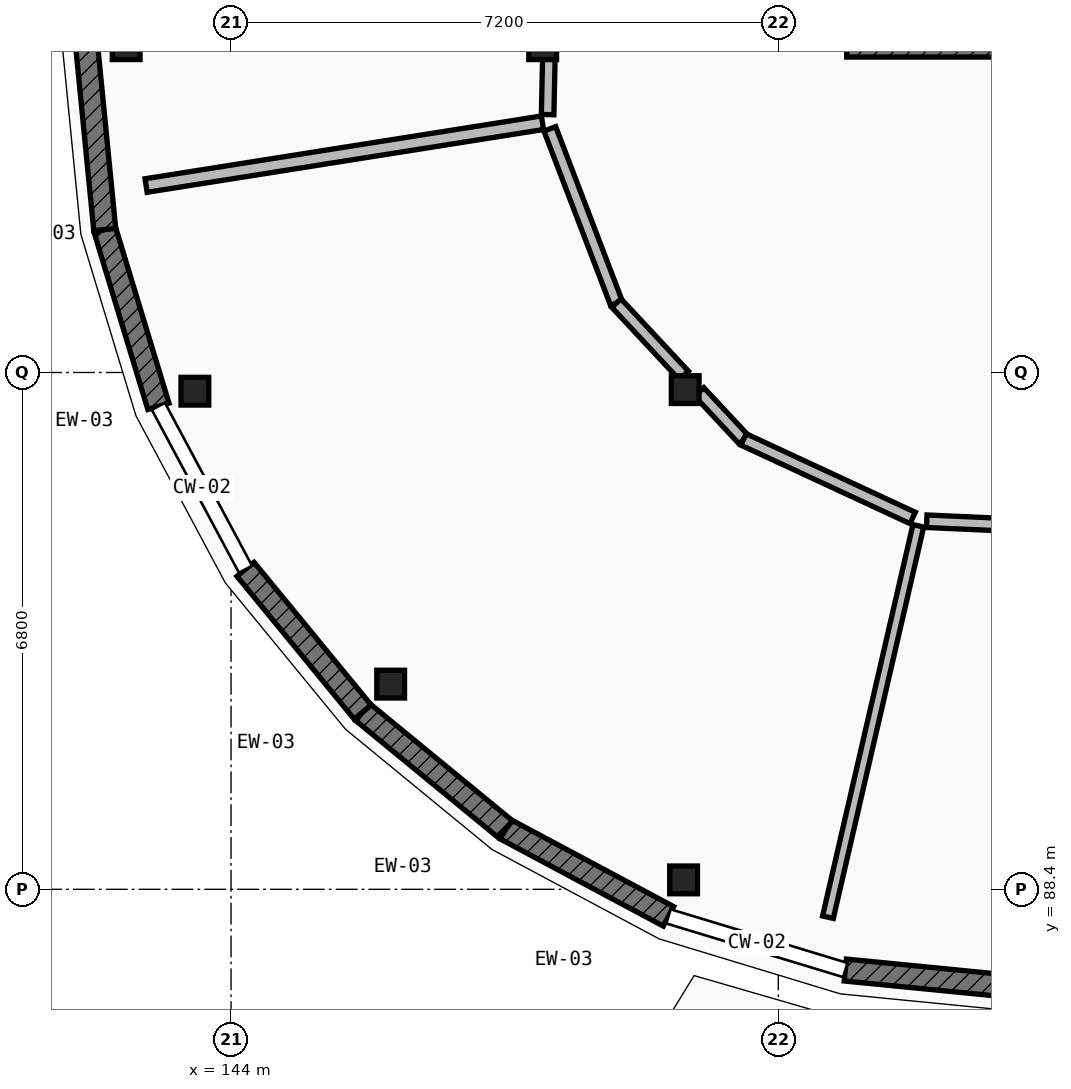
"""IFC4 building model, lengths in metres.
Left out: names, types, materials, properties, quantities, classifications, styles, units other than length and angle.
Written with IfcOpenShell. Run it as: python <this file> out.ifc"""

import sys

from ifc_helpers import new_model, si_unit, direction, frame, frame_2d, origin, origin_2d, place, context, subcontext, project, spatial, rectangle, extrude, element, fill, save


model = new_model("IFC4")
c1 = context("Model", 3, precision=1e-05, world=origin(), true_north=direction((0.0, 1.0)))
c2 = subcontext(c1, "Body", "Model", "MODEL_VIEW")
j1 = project(units=[si_unit("LENGTHUNIT", "METRE"), si_unit("PLANEANGLEUNIT", "RADIAN")], contexts=[c1])
p1 = place(None, origin())
s1 = spatial("IfcSite", under=j1, at=p1, CompositionType="ELEMENT")
p2 = place(p1, origin())
s2 = spatial("IfcBuilding", under=s1, at=p2, CompositionType="ELEMENT")
p3 = place(p2, frame((0.0, 0.0, 8.75)))
s3 = spatial("IfcBuildingStorey", under=s2, at=p3, CompositionType="ELEMENT", Elevation=8.75)
for number, where, z_axis, x_axis in (
    (1, (142.62, 99.5, 0.0), (0.0, 0.0, 1.0), (1.0, 0.0, 0.0)),
    (2, (143.524, 94.954, 0.0), (0.0, 0.0, 1.0), (1.0, 0.0, 0.0)),
    (3, (146.1, 91.1, 0.0), (0.0, 0.0, 1.0), (1.0, 0.0, 0.0)),
    (4, (149.954, 88.524, 0.0), (0.0, 0.0, 1.0), (1.0, 0.0, 0.0)),
    (5, (148.1, 99.5, 0.0), (0.0, 0.0, 1.0), (1.0, 0.0, 0.0)),
    (6, (149.975, 94.975, 0.0), (0.0, 0.0, 1.0), (1.0, 0.0, 0.0)),
):
    element("IfcColumn", number, at=place(p3, frame(where, z_axis=z_axis, x_axis=x_axis)), inside=s3, PredefinedType="COLUMN", context=c2, shape_type="SweptSolid", body=[
        extrude(rectangle(XDim=0.365, YDim=0.365, at=origin_2d()), origin(), (0.0, 0.0, 1.0), 4.2),
    ])
p4 = place(p3, frame((154.5, 87.1, 0.0), z_axis=(0.0, 0.0, 1.0), x_axis=(-0.995202863323, 0.097832820839, 0.0)))
e7 = element("IfcWall", 7, at=p4, inside=s3, PredefinedType="ELEMENTEDWALL", context=c2, shape_type="SweptSolid", body=[
    extrude(rectangle(XDim=2.431, YDim=0.29, at=frame_2d((1.215, 0.0))), origin(), (0.0, 0.0, 1.0), 3.329),
])
p5 = place(p4, frame((0.59, 0.0, 0.85)))
e8 = element("IfcOpeningElement", 8, at=p5, cuts=e7, PredefinedType="OPENING", context=c2, shape_type="SweptSolid", body=[
    extrude(rectangle(XDim=1.25, YDim=2.1, at=frame_2d((0.625, 1.05))), frame((0.0, 0.155, 0.0), z_axis=(0.0, -1.0, 0.0), x_axis=(1.0, 0.0, 0.0)), (0.0, 0.0, 1.0), 0.31),
])
p6 = place(p3, frame((149.755, 88.044, 0.0), z_axis=(0.0, 0.0, 1.0), x_axis=(-0.881902152415, 0.471432490996, 0.0)))
e9 = element("IfcWall", 9, at=p6, inside=s3, PredefinedType="ELEMENTEDWALL", context=c2, shape_type="SweptSolid", body=[
    extrude(rectangle(XDim=2.431, YDim=0.29, at=frame_2d((1.215, 0.0))), origin(), (0.0, 0.0, 1.0), 3.329),
])
p7 = place(p6, frame((0.576, 0.0, 0.85)))
e10 = element("IfcOpeningElement", 10, at=p7, cuts=e9, PredefinedType="OPENING", context=c2, shape_type="SweptSolid", body=[
    extrude(rectangle(XDim=1.28, YDim=1.65, at=frame_2d((0.64, 0.825))), frame((0.0, 0.155, 0.0), z_axis=(0.0, -1.0, 0.0), x_axis=(1.0, 0.0, 0.0)), (0.0, 0.0, 1.0), 0.31),
])
p8 = place(p3, frame((147.611, 89.19, 0.0), z_axis=(0.0, 0.0, 1.0), x_axis=(-0.773048113134, 0.634347392822, 0.0)))
e11 = element("IfcWall", 11, at=p8, inside=s3, PredefinedType="ELEMENTEDWALL", context=c2, shape_type="SweptSolid", body=[
    extrude(rectangle(XDim=2.431, YDim=0.29, at=frame_2d((1.215, 0.0))), origin(), (0.0, 0.0, 1.0), 3.329),
])
p9 = place(p8, frame((0.565, 0.0, 0.85)))
e12 = element("IfcOpeningElement", 12, at=p9, cuts=e11, PredefinedType="OPENING", context=c2, shape_type="SweptSolid", body=[
    extrude(rectangle(XDim=1.3, YDim=1.4, at=frame_2d((0.65, 0.7))), frame((0.0, 0.155, 0.0), z_axis=(0.0, -1.0, 0.0), x_axis=(1.0, 0.0, 0.0)), (0.0, 0.0, 1.0), 0.31),
])
p10 = place(p3, frame((145.732, 90.732, 0.0), z_axis=(0.0, 0.0, 1.0), x_axis=(-0.634347392822, 0.773048113134, 0.0)))
e13 = element("IfcWall", 13, at=p10, inside=s3, PredefinedType="ELEMENTEDWALL", context=c2, shape_type="SweptSolid", body=[
    extrude(rectangle(XDim=2.431, YDim=0.29, at=frame_2d((1.215, 0.0))), origin(), (0.0, 0.0, 1.0), 3.329),
])
p11 = place(p10, frame((0.565, 0.0, 0.85)))
e14 = element("IfcOpeningElement", 14, at=p11, cuts=e13, PredefinedType="OPENING", context=c2, shape_type="SweptSolid", body=[
    extrude(rectangle(XDim=1.3, YDim=1.7, at=frame_2d((0.65, 0.85))), frame((0.0, 0.155, 0.0), z_axis=(0.0, -1.0, 0.0), x_axis=(1.0, 0.0, 0.0)), (0.0, 0.0, 1.0), 0.31),
])
p12 = place(p3, frame((143.044, 94.755, 0.0), z_axis=(0.0, 0.0, 1.0), x_axis=(-0.290442193951, 0.956892539407, 0.0)))
e15 = element("IfcWall", 15, at=p12, inside=s3, PredefinedType="ELEMENTEDWALL", context=c2, shape_type="SweptSolid", body=[
    extrude(rectangle(XDim=2.431, YDim=0.29, at=frame_2d((1.215, 0.0))), origin(), (0.0, 0.0, 1.0), 3.329),
])
p13 = place(p12, frame((0.565, 0.0, 0.85)))
e16 = element("IfcOpeningElement", 16, at=p13, cuts=e15, PredefinedType="OPENING", context=c2, shape_type="SweptSolid", body=[
    extrude(rectangle(XDim=1.3, YDim=2.0, at=frame_2d((0.65, 1.0))), frame((0.0, 0.155, 0.0), z_axis=(0.0, -1.0, 0.0), x_axis=(1.0, 0.0, 0.0)), (0.0, 0.0, 1.0), 0.31),
])
p14 = place(p3, frame((142.338, 97.081, 0.0), z_axis=(0.0, 0.0, 1.0), x_axis=(-0.097832820839, 0.995202863323, 0.0)))
e17 = element("IfcWall", 17, at=p14, inside=s3, PredefinedType="ELEMENTEDWALL", context=c2, shape_type="SweptSolid", body=[
    extrude(rectangle(XDim=2.431, YDim=0.29, at=frame_2d((1.215, 0.0))), origin(), (0.0, 0.0, 1.0), 3.329),
])
p15 = place(p14, frame((0.565, 0.0, 0.7)))
e18 = element("IfcOpeningElement", 18, at=p15, cuts=e17, PredefinedType="OPENING", context=c2, shape_type="SweptSolid", body=[
    extrude(rectangle(XDim=1.3, YDim=2.3, at=frame_2d((0.65, 1.15))), frame((0.0, 0.155, 0.0), z_axis=(0.0, -1.0, 0.0), x_axis=(1.0, 0.0, 0.0)), (0.0, 0.0, 1.0), 0.31),
])
p16 = place(p3, frame((152.1, 99.463, 0.0), z_axis=(0.0, 0.0, 1.0), x_axis=(1.0, 0.0, 0.0)))
e19 = element("IfcWall", 19, at=p16, inside=s3, PredefinedType="SHEAR", context=c2, shape_type="SweptSolid", body=[
    extrude(rectangle(XDim=3.1, YDim=0.225, at=frame_2d((1.55, 0.0))), origin(), (0.0, 0.0, 1.0), 3.975),
])
p17 = place(p16, frame((0.9, 0.0, 0.0)))
e20 = element("IfcOpeningElement", 20, at=p17, cuts=e19, PredefinedType="OPENING", context=c2, shape_type="SweptSolid", body=[
    extrude(rectangle(XDim=1.3, YDim=2.2, at=frame_2d((0.65, 1.1))), frame((0.0, 0.123, 0.0), z_axis=(0.0, -1.0, 0.0), x_axis=(1.0, 0.0, 0.0)), (0.0, 0.0, 1.0), 0.245),
])
p18 = place(p3, frame((148.097, 98.486, 0.0), z_axis=(0.0, 0.0, 1.0), x_axis=(-0.98768185006, -0.156475439167, 0.0)))
e21 = element("IfcWall", 21, at=p18, inside=s3, PredefinedType="PARTITIONING", context=c2, shape_type="SweptSolid", body=[
    extrude(rectangle(XDim=5.28, YDim=0.18, at=frame_2d((2.64, 0.0))), origin(), (0.0, 0.0, 1.0), 3.304),
])
p19 = place(p3, frame((153.042, 93.183, 0.0), z_axis=(0.0, 0.0, 1.0), x_axis=(-0.224943840984, -0.974371730093, 0.0)))
e22 = element("IfcWall", 22, at=p19, inside=s3, PredefinedType="PARTITIONING", context=c2, shape_type="SweptSolid", body=[
    extrude(rectangle(XDim=5.286, YDim=0.145, at=frame_2d((2.643, 0.0))), origin(), (0.0, 0.0, 1.0), 3.304),
])
p20 = place(p3, frame((148.181, 99.331, 0.0), z_axis=(0.0, 0.0, 1.0), x_axis=(-0.021496850658, -0.999768916006, 0.0)))
e23 = element("IfcWall", 23, at=p20, inside=s3, PredefinedType="PARTITIONING", context=c2, shape_type="SweptSolid", body=[
    extrude(rectangle(XDim=0.738, YDim=0.165, at=frame_2d((0.369, 0.0))), origin(), (0.0, 0.0, 1.0), 3.304),
])
p21 = place(p3, frame((148.194, 98.405, 0.0), z_axis=(0.0, 0.0, 1.0), x_axis=(0.357004696351, -0.934102589004, 0.0)))
e24 = element("IfcWall", 24, at=p21, inside=s3, PredefinedType="PARTITIONING", context=c2, shape_type="SweptSolid", body=[
    extrude(rectangle(XDim=2.454, YDim=0.165, at=frame_2d((1.227, 0.0))), origin(), (0.0, 0.0, 1.0), 3.304),
])
p22 = place(p21, frame((0.477, 0.0, 0.0)))
e25 = element("IfcOpeningElement", 25, at=p22, cuts=e24, PredefinedType="OPENING", context=c2, shape_type="SweptSolid", body=[
    extrude(rectangle(XDim=1.5, YDim=2.3, at=frame_2d((0.75, 1.15))), frame((0.0, 0.093, 0.0), z_axis=(0.0, -1.0, 0.0), x_axis=(1.0, 0.0, 0.0)), (0.0, 0.0, 1.0), 0.185),
])
p23 = place(p3, frame((149.07, 96.113, 0.0), z_axis=(0.0, 0.0, 1.0), x_axis=(0.682084089324, -0.731273748395, 0.0)))
e26 = element("IfcWall", 26, at=p23, inside=s3, PredefinedType="PARTITIONING", context=c2, shape_type="SweptSolid", body=[
    extrude(rectangle(XDim=1.3, YDim=0.165, at=frame_2d((0.65, 0.0))), origin(), (0.0, 0.0, 1.0), 3.304),
])
p24 = place(p3, frame((150.16, 94.944, 0.0), z_axis=(0.0, 0.0, 1.0), x_axis=(0.682114678072, -0.731245216024, 0.0)))
e27 = element("IfcWall", 27, at=p24, inside=s3, PredefinedType="PARTITIONING", context=c2, shape_type="SweptSolid", body=[
    extrude(rectangle(XDim=0.855, YDim=0.165, at=frame_2d((0.427, 0.0))), origin(), (0.0, 0.0, 1.0), 3.304),
])
p25 = place(p3, frame((150.743, 94.319, 0.0), z_axis=(0.0, 0.0, 1.0), x_axis=(0.906989961647, -0.421152240255, 0.0)))
e28 = element("IfcWall", 28, at=p25, inside=s3, PredefinedType="PARTITIONING", context=c2, shape_type="SweptSolid", body=[
    extrude(rectangle(XDim=2.453, YDim=0.165, at=frame_2d((1.227, 0.0))), origin(), (0.0, 0.0, 1.0), 3.304),
])
p26 = place(p3, frame((153.153, 93.243, 0.0), z_axis=(0.0, 0.0, 1.0), x_axis=(0.998998504247, -0.044743586258, 0.0)))
e29 = element("IfcWall", 29, at=p26, inside=s3, PredefinedType="PARTITIONING", context=c2, shape_type="SweptSolid", body=[
    extrude(rectangle(XDim=1.184, YDim=0.165, at=frame_2d((0.592, 0.0))), origin(), (0.0, 0.0, 1.0), 3.304),
])
p27 = place(p5, origin())
e30 = element("IfcWindow", 30, at=p27, inside=s3, PartitioningType="SINGLE_PANEL", PredefinedType="WINDOW", context=c2, shape_type="SweptSolid", body=[
    extrude(rectangle(XDim=1.25, YDim=2.1, at=frame_2d((0.625, 1.05))), frame((0.0, 0.03, 0.0), z_axis=(0.0, -1.0, 0.0), x_axis=(1.0, 0.0, 0.0)), (0.0, 0.0, 1.0), 0.06),
])
fill(e8, e30)
p28 = place(p7, origin())
e31 = element("IfcWindow", 31, at=p28, inside=s3, PartitioningType="SINGLE_PANEL", PredefinedType="WINDOW", context=c2, shape_type="SweptSolid", body=[
    extrude(rectangle(XDim=1.28, YDim=1.65, at=frame_2d((0.64, 0.825))), frame((0.0, 0.03, 0.0), z_axis=(0.0, -1.0, 0.0), x_axis=(1.0, 0.0, 0.0)), (0.0, 0.0, 1.0), 0.06),
])
fill(e10, e31)
p29 = place(p9, origin())
e32 = element("IfcWindow", 32, at=p29, inside=s3, PartitioningType="SINGLE_PANEL", PredefinedType="WINDOW", context=c2, shape_type="SweptSolid", body=[
    extrude(rectangle(XDim=1.3, YDim=1.4, at=frame_2d((0.65, 0.7))), frame((0.0, 0.03, 0.0), z_axis=(0.0, -1.0, 0.0), x_axis=(1.0, 0.0, 0.0)), (0.0, 0.0, 1.0), 0.06),
])
fill(e12, e32)
p30 = place(p11, origin())
e33 = element("IfcWindow", 33, at=p30, inside=s3, PartitioningType="SINGLE_PANEL", PredefinedType="WINDOW", context=c2, shape_type="SweptSolid", body=[
    extrude(rectangle(XDim=1.3, YDim=1.7, at=frame_2d((0.65, 0.85))), frame((0.0, 0.03, 0.0), z_axis=(0.0, -1.0, 0.0), x_axis=(1.0, 0.0, 0.0)), (0.0, 0.0, 1.0), 0.06),
])
fill(e14, e33)
p31 = place(p13, origin())
e34 = element("IfcWindow", 34, at=p31, inside=s3, PartitioningType="SINGLE_PANEL", PredefinedType="WINDOW", context=c2, shape_type="SweptSolid", body=[
    extrude(rectangle(XDim=1.3, YDim=2.0, at=frame_2d((0.65, 1.0))), frame((0.0, 0.03, 0.0), z_axis=(0.0, -1.0, 0.0), x_axis=(1.0, 0.0, 0.0)), (0.0, 0.0, 1.0), 0.06),
])
fill(e16, e34)
p32 = place(p15, origin())
e35 = element("IfcWindow", 35, at=p32, inside=s3, PartitioningType="SINGLE_PANEL", PredefinedType="WINDOW", context=c2, shape_type="SweptSolid", body=[
    extrude(rectangle(XDim=1.3, YDim=2.3, at=frame_2d((0.65, 1.15))), frame((0.0, 0.03, 0.0), z_axis=(0.0, -1.0, 0.0), x_axis=(1.0, 0.0, 0.0)), (0.0, 0.0, 1.0), 0.06),
])
fill(e18, e35)
p33 = place(p22, origin())
e36 = element("IfcDoor", 36, at=p33, inside=s3, OperationType="SINGLE_SWING_RIGHT", PredefinedType="DOOR", context=c2, shape_type="SweptSolid", body=[
    extrude(rectangle(XDim=1.5, YDim=2.3, at=frame_2d((0.75, 1.15))), frame((0.0, 0.025, 0.0), z_axis=(0.0, -1.0, 0.0), x_axis=(1.0, 0.0, 0.0)), (0.0, 0.0, 1.0), 0.05),
])
fill(e25, e36)
save(model, sys.argv[1])
